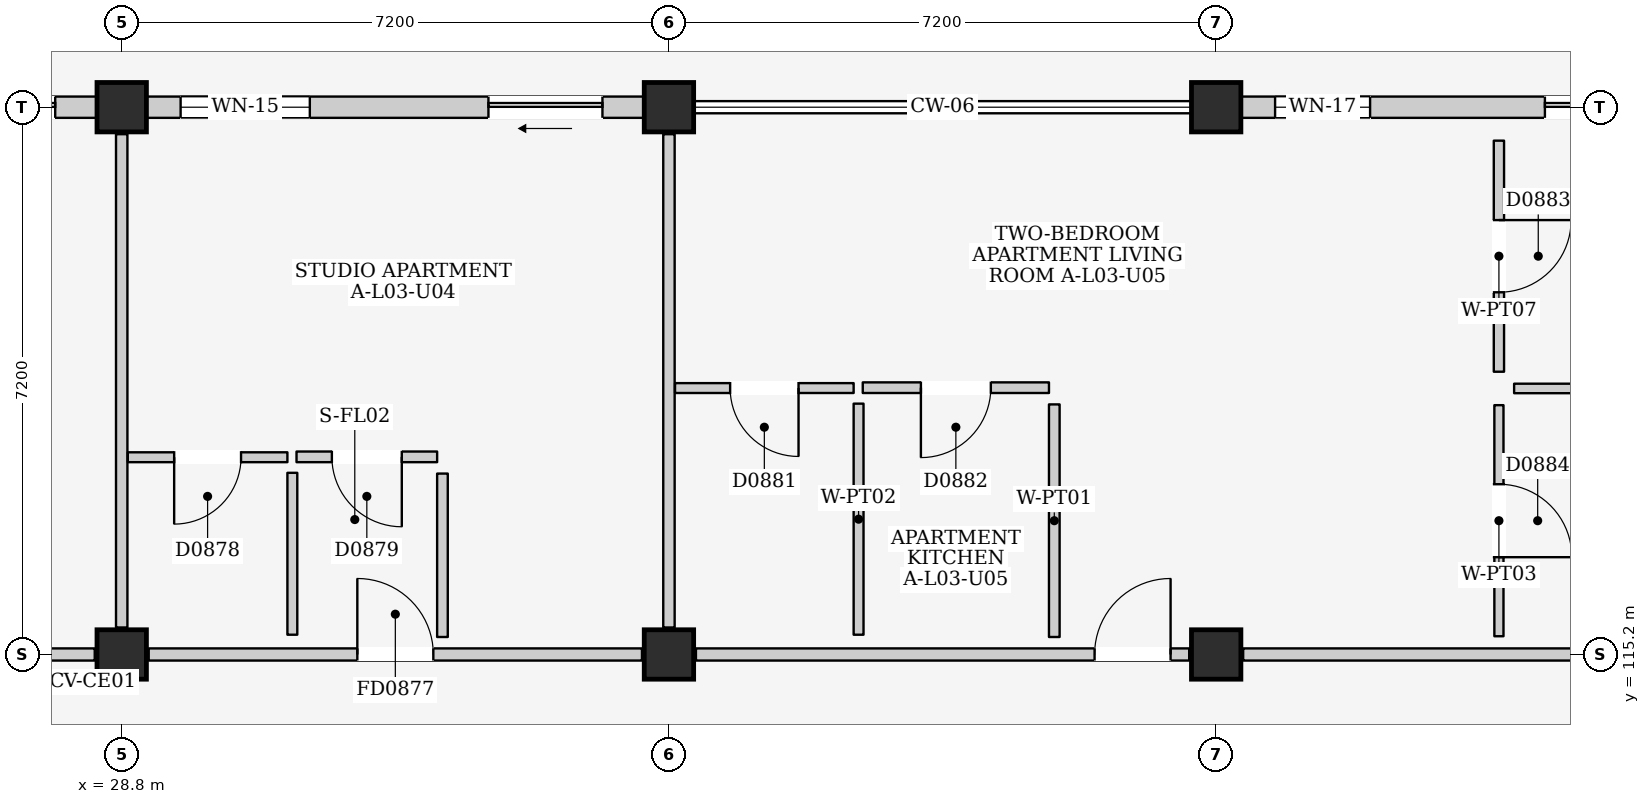
"""IFC4 building model, lengths in metres.
Left out: names, types, materials, properties, quantities, classifications, styles, units other than length and angle.
Written with IfcOpenShell. Run it as: python <this file> out.ifc"""

import sys

from ifc_helpers import new_model, si_unit, direction, frame, frame_2d, origin, origin_2d, place, context, subcontext, project, spatial, rectangle, extrude, element, fill, save


model = new_model("IFC4")
c1 = context("Model", 3, precision=1e-05, world=origin(), true_north=direction((0.0, 1.0)))
c2 = subcontext(c1, "Body", "Model", "MODEL_VIEW")
j1 = project(units=[si_unit("LENGTHUNIT", "METRE"), si_unit("PLANEANGLEUNIT", "RADIAN")], contexts=[c1])
p1 = place(None, origin())
s1 = spatial("IfcSite", under=j1, at=p1, CompositionType="ELEMENT")
p2 = place(p1, origin())
s2 = spatial("IfcBuilding", under=s1, at=p2, CompositionType="ELEMENT")
p3 = place(p2, frame((0.0, 0.0, 12.2)))
s3 = spatial("IfcBuildingStorey", under=s2, at=p3, CompositionType="ELEMENT", Elevation=12.2)
for number, where, z_axis, x_axis in (
    (1, (28.8, 115.2, 0.0), (0.0, 0.0, 1.0), (1.0, 0.0, 0.0)),
    (2, (28.8, 122.4, 0.0), (0.0, 0.0, 1.0), (1.0, 0.0, 0.0)),
    (3, (36.0, 115.2, 0.0), (0.0, 0.0, 1.0), (1.0, 0.0, 0.0)),
    (4, (36.0, 122.4, 0.0), (0.0, 0.0, 1.0), (1.0, 0.0, 0.0)),
    (5, (43.2, 115.2, 0.0), (0.0, 0.0, 1.0), (1.0, 0.0, 0.0)),
    (6, (43.2, 122.4, 0.0), (0.0, 0.0, 1.0), (1.0, 0.0, 0.0)),
):
    element("IfcColumn", number, at=place(p3, frame(where, z_axis=z_axis, x_axis=x_axis)), inside=s3, PredefinedType="COLUMN", context=c2, shape_type="SweptSolid", body=[
        extrude(rectangle(XDim=0.65, YDim=0.65, at=origin_2d()), origin(), (0.0, 0.0, 1.0), 3.2),
    ])
p4 = place(p3, frame((21.925, 122.4, 0.0), z_axis=(0.0, 0.0, 1.0), x_axis=(1.0, 0.0, 0.0)))
e7 = element("IfcWall", 7, at=p4, inside=s3, PredefinedType="ELEMENTEDWALL", context=c2, shape_type="SweptSolid", body=[
    extrude(rectangle(XDim=6.55, YDim=0.28, at=frame_2d((3.275, 0.0))), origin(), (0.0, 0.0, 1.0), 2.445),
])
p5 = place(p4, frame((4.4, 0.0, 0.0)))
e8 = element("IfcOpeningElement", 8, at=p5, cuts=e7, PredefinedType="OPENING", context=c2, shape_type="SweptSolid", body=[
    extrude(rectangle(XDim=1.6, YDim=2.12, at=frame_2d((0.8, 1.06))), frame((0.0, 0.155, 0.0), z_axis=(0.0, -1.0, 0.0), x_axis=(1.0, 0.0, 0.0)), (0.0, 0.0, 1.0), 0.31),
])
p6 = place(p4, frame((0.45, 0.0, 0.835)))
e9 = element("IfcOpeningElement", 9, at=p6, cuts=e7, PredefinedType="OPENING", context=c2, shape_type="SweptSolid", body=[
    extrude(rectangle(XDim=1.35, YDim=1.5, at=frame_2d((0.675, 0.75))), frame((0.0, 0.155, 0.0), z_axis=(0.0, -1.0, 0.0), x_axis=(1.0, 0.0, 0.0)), (0.0, 0.0, 1.0), 0.31),
])
p7 = place(p3, frame((29.125, 122.4, 0.0), z_axis=(0.0, 0.0, 1.0), x_axis=(1.0, 0.0, 0.0)))
e10 = element("IfcWall", 10, at=p7, inside=s3, PredefinedType="ELEMENTEDWALL", context=c2, shape_type="SweptSolid", body=[
    extrude(rectangle(XDim=6.55, YDim=0.28, at=frame_2d((3.275, 0.0))), origin(), (0.0, 0.0, 1.0), 2.445),
])
p8 = place(p7, frame((4.5, 0.0, 0.0)))
e11 = element("IfcOpeningElement", 11, at=p8, cuts=e10, PredefinedType="OPENING", context=c2, shape_type="SweptSolid", body=[
    extrude(rectangle(XDim=1.5, YDim=2.12, at=frame_2d((0.75, 1.06))), frame((0.0, 0.155, 0.0), z_axis=(0.0, -1.0, 0.0), x_axis=(1.0, 0.0, 0.0)), (0.0, 0.0, 1.0), 0.31),
])
p9 = place(p7, frame((0.45, 0.0, 0.885)))
e12 = element("IfcOpeningElement", 12, at=p9, cuts=e10, PredefinedType="OPENING", context=c2, shape_type="SweptSolid", body=[
    extrude(rectangle(XDim=1.7, YDim=1.45, at=frame_2d((0.85, 0.725))), frame((0.0, 0.155, 0.0), z_axis=(0.0, -1.0, 0.0), x_axis=(1.0, 0.0, 0.0)), (0.0, 0.0, 1.0), 0.31),
])
p10 = place(p3, frame((43.525, 122.4, 0.0), z_axis=(0.0, 0.0, 1.0), x_axis=(1.0, 0.0, 0.0)))
e13 = element("IfcWall", 13, at=p10, inside=s3, PredefinedType="ELEMENTEDWALL", context=c2, shape_type="SweptSolid", body=[
    extrude(rectangle(XDim=6.55, YDim=0.28, at=frame_2d((3.275, 0.0))), origin(), (0.0, 0.0, 1.0), 2.445),
])
p11 = place(p10, frame((4.0, 0.0, 0.0)))
e14 = element("IfcOpeningElement", 14, at=p11, cuts=e13, PredefinedType="OPENING", context=c2, shape_type="SweptSolid", body=[
    extrude(rectangle(XDim=2.0, YDim=2.12, at=frame_2d((1.0, 1.06))), frame((0.0, 0.155, 0.0), z_axis=(0.0, -1.0, 0.0), x_axis=(1.0, 0.0, 0.0)), (0.0, 0.0, 1.0), 0.31),
])
p12 = place(p10, frame((0.45, 0.0, 0.9)))
e15 = element("IfcOpeningElement", 15, at=p12, cuts=e13, PredefinedType="OPENING", context=c2, shape_type="SweptSolid", body=[
    extrude(rectangle(XDim=1.25, YDim=1.3, at=frame_2d((0.625, 0.65))), frame((0.0, 0.155, 0.0), z_axis=(0.0, -1.0, 0.0), x_axis=(1.0, 0.0, 0.0)), (0.0, 0.0, 1.0), 0.31),
])
p13 = place(p3, frame((21.955, 115.2, 0.0), z_axis=(0.0, 0.0, 1.0), x_axis=(1.0, 0.0, 0.0)))
e16 = element("IfcWall", 16, at=p13, inside=s3, PredefinedType="PARTITIONING", context=c2, shape_type="SweptSolid", body=[
    extrude(rectangle(XDim=6.49, YDim=0.16, at=frame_2d((3.245, 0.0))), origin(), (0.0, 0.0, 1.0), 2.315),
])
p14 = place(p13, frame((2.745, 0.0, 0.0)))
e17 = element("IfcOpeningElement", 17, at=p14, cuts=e16, PredefinedType="OPENING", context=c2, shape_type="SweptSolid", body=[
    extrude(rectangle(XDim=1.0, YDim=2.15, at=frame_2d((0.5, 1.075))), frame((0.0, 0.095, 0.0), z_axis=(0.0, -1.0, 0.0), x_axis=(1.0, 0.0, 0.0)), (0.0, 0.0, 1.0), 0.19),
])
p15 = place(p3, frame((28.8, 115.555, 0.0), z_axis=(0.0, 0.0, 1.0), x_axis=(0.0, 1.0, 0.0)))
e18 = element("IfcWall", 18, at=p15, inside=s3, PredefinedType="PARTITIONING", context=c2, shape_type="SweptSolid", body=[
    extrude(rectangle(XDim=6.49, YDim=0.15, at=frame_2d((3.245, 0.0))), origin(), (0.0, 0.0, 1.0), 2.415),
])
p16 = place(p3, frame((29.155, 115.2, 0.0), z_axis=(0.0, 0.0, 1.0), x_axis=(1.0, 0.0, 0.0)))
e19 = element("IfcWall", 19, at=p16, inside=s3, PredefinedType="PARTITIONING", context=c2, shape_type="SweptSolid", body=[
    extrude(rectangle(XDim=6.49, YDim=0.16, at=frame_2d((3.245, 0.0))), origin(), (0.0, 0.0, 1.0), 2.315),
])
p17 = place(p16, frame((2.745, 0.0, 0.0)))
e20 = element("IfcOpeningElement", 20, at=p17, cuts=e19, PredefinedType="OPENING", context=c2, shape_type="SweptSolid", body=[
    extrude(rectangle(XDim=1.0, YDim=2.15, at=frame_2d((0.5, 1.075))), frame((0.0, 0.095, 0.0), z_axis=(0.0, -1.0, 0.0), x_axis=(1.0, 0.0, 0.0)), (0.0, 0.0, 1.0), 0.19),
])
p18 = place(p3, frame((36.0, 115.555, 0.0), z_axis=(0.0, 0.0, 1.0), x_axis=(0.0, 1.0, 0.0)))
e21 = element("IfcWall", 21, at=p18, inside=s3, PredefinedType="PARTITIONING", context=c2, shape_type="SweptSolid", body=[
    extrude(rectangle(XDim=6.49, YDim=0.15, at=frame_2d((3.245, 0.0))), origin(), (0.0, 0.0, 1.0), 2.415),
])
p19 = place(p3, frame((28.88, 117.795, 0.0), z_axis=(0.0, 0.0, 1.0), x_axis=(1.0, 0.0, 0.0)))
e22 = element("IfcWall", 22, at=p19, inside=s3, PredefinedType="PARTITIONING", context=c2, shape_type="SweptSolid", body=[
    extrude(rectangle(XDim=2.1, YDim=0.13, at=frame_2d((1.05, 0.0))), origin(), (0.0, 0.0, 1.0), 2.98),
])
p20 = place(p19, frame((0.61, 0.0, 0.0)))
e23 = element("IfcOpeningElement", 23, at=p20, cuts=e22, PredefinedType="OPENING", context=c2, shape_type="SweptSolid", body=[
    extrude(rectangle(XDim=0.88, YDim=2.1, at=frame_2d((0.44, 1.05))), frame((0.0, 0.08, 0.0), z_axis=(0.0, -1.0, 0.0), x_axis=(1.0, 0.0, 0.0)), (0.0, 0.0, 1.0), 0.16),
])
p21 = place(p3, frame((31.045, 115.46, 0.0), z_axis=(0.0, 0.0, 1.0), x_axis=(0.0, 1.0, 0.0)))
e24 = element("IfcWall", 24, at=p21, inside=s3, PredefinedType="PARTITIONING", context=c2, shape_type="SweptSolid", body=[
    extrude(rectangle(XDim=2.13, YDim=0.13, at=frame_2d((1.065, 0.0))), origin(), (0.0, 0.0, 1.0), 2.98),
])
p22 = place(p3, frame((31.1, 117.8, 0.0), z_axis=(0.0, 0.0, 1.0), x_axis=(1.0, 0.0, 0.0)))
e25 = element("IfcWall", 25, at=p22, inside=s3, PredefinedType="PARTITIONING", context=c2, shape_type="SweptSolid", body=[
    extrude(rectangle(XDim=1.85, YDim=0.14, at=frame_2d((0.925, 0.0))), origin(), (0.0, 0.0, 1.0), 2.98),
])
p23 = place(p22, frame((0.465, 0.0, 0.0)))
e26 = element("IfcOpeningElement", 26, at=p23, cuts=e25, PredefinedType="OPENING", context=c2, shape_type="SweptSolid", body=[
    extrude(rectangle(XDim=0.92, YDim=2.1, at=frame_2d((0.46, 1.05))), frame((0.0, 0.085, 0.0), z_axis=(0.0, -1.0, 0.0), x_axis=(1.0, 0.0, 0.0)), (0.0, 0.0, 1.0), 0.17),
])
p24 = place(p3, frame((33.02, 115.43, 0.0), z_axis=(0.0, 0.0, 1.0), x_axis=(0.0, 1.0, 0.0)))
e27 = element("IfcWall", 27, at=p24, inside=s3, PredefinedType="PARTITIONING", context=c2, shape_type="SweptSolid", body=[
    extrude(rectangle(XDim=2.15, YDim=0.14, at=frame_2d((1.075, 0.0))), origin(), (0.0, 0.0, 1.0), 2.98),
])
p25 = place(p3, frame((36.355, 115.2, 0.0), z_axis=(0.0, 0.0, 1.0), x_axis=(1.0, 0.0, 0.0)))
e28 = element("IfcWall", 28, at=p25, inside=s3, PredefinedType="PARTITIONING", context=c2, shape_type="SweptSolid", body=[
    extrude(rectangle(XDim=6.49, YDim=0.16, at=frame_2d((3.245, 0.0))), origin(), (0.0, 0.0, 1.0), 2.315),
])
p26 = place(p25, frame((5.245, 0.0, 0.0)))
e29 = element("IfcOpeningElement", 29, at=p26, cuts=e28, PredefinedType="OPENING", context=c2, shape_type="SweptSolid", body=[
    extrude(rectangle(XDim=1.0, YDim=2.15, at=frame_2d((0.5, 1.075))), frame((0.0, 0.095, 0.0), z_axis=(0.0, -1.0, 0.0), x_axis=(1.0, 0.0, 0.0)), (0.0, 0.0, 1.0), 0.19),
])
p27 = place(p3, frame((43.555, 115.2, 0.0), z_axis=(0.0, 0.0, 1.0), x_axis=(1.0, 0.0, 0.0)))
e30 = element("IfcWall", 30, at=p27, inside=s3, PredefinedType="PARTITIONING", context=c2, shape_type="SweptSolid", body=[
    extrude(rectangle(XDim=6.49, YDim=0.16, at=frame_2d((3.245, 0.0))), origin(), (0.0, 0.0, 1.0), 2.315),
])
p28 = place(p3, frame((36.08, 118.705, 0.0), z_axis=(0.0, 0.0, 1.0), x_axis=(1.0, 0.0, 0.0)))
e31 = element("IfcWall", 31, at=p28, inside=s3, PredefinedType="PARTITIONING", context=c2, shape_type="SweptSolid", body=[
    extrude(rectangle(XDim=2.35, YDim=0.13, at=frame_2d((1.175, 0.0))), origin(), (0.0, 0.0, 1.0), 2.98),
])
p29 = place(p28, frame((0.725, 0.0, 0.0)))
e32 = element("IfcOpeningElement", 32, at=p29, cuts=e31, PredefinedType="OPENING", context=c2, shape_type="SweptSolid", body=[
    extrude(rectangle(XDim=0.9, YDim=2.1, at=frame_2d((0.45, 1.05))), frame((0.0, 0.08, 0.0), z_axis=(0.0, -1.0, 0.0), x_axis=(1.0, 0.0, 0.0)), (0.0, 0.0, 1.0), 0.16),
])
p30 = place(p3, frame((38.495, 115.46, 0.0), z_axis=(0.0, 0.0, 1.0), x_axis=(0.0, 1.0, 0.0)))
e33 = element("IfcWall", 33, at=p30, inside=s3, PredefinedType="PARTITIONING", context=c2, shape_type="SweptSolid", body=[
    extrude(rectangle(XDim=3.04, YDim=0.13, at=frame_2d((1.52, 0.0))), origin(), (0.0, 0.0, 1.0), 2.98),
])
p31 = place(p3, frame((38.55, 118.71, 0.0), z_axis=(0.0, 0.0, 1.0), x_axis=(1.0, 0.0, 0.0)))
e34 = element("IfcWall", 34, at=p31, inside=s3, PredefinedType="PARTITIONING", context=c2, shape_type="SweptSolid", body=[
    extrude(rectangle(XDim=2.45, YDim=0.14, at=frame_2d((1.225, 0.0))), origin(), (0.0, 0.0, 1.0), 2.98),
])
p32 = place(p31, frame((0.765, 0.0, 0.0)))
e35 = element("IfcOpeningElement", 35, at=p32, cuts=e34, PredefinedType="OPENING", context=c2, shape_type="SweptSolid", body=[
    extrude(rectangle(XDim=0.92, YDim=2.1, at=frame_2d((0.46, 1.05))), frame((0.0, 0.085, 0.0), z_axis=(0.0, -1.0, 0.0), x_axis=(1.0, 0.0, 0.0)), (0.0, 0.0, 1.0), 0.17),
])
p33 = place(p3, frame((41.07, 115.43, 0.0), z_axis=(0.0, 0.0, 1.0), x_axis=(0.0, 1.0, 0.0)))
e36 = element("IfcWall", 36, at=p33, inside=s3, PredefinedType="PARTITIONING", context=c2, shape_type="SweptSolid", body=[
    extrude(rectangle(XDim=3.06, YDim=0.14, at=frame_2d((1.53, 0.0))), origin(), (0.0, 0.0, 1.0), 2.98),
])
p34 = place(p3, frame((46.92, 118.92, 0.0), z_axis=(0.0, 0.0, 1.0), x_axis=(0.0, 1.0, 0.0)))
e37 = element("IfcWall", 37, at=p34, inside=s3, PredefinedType="PARTITIONING", context=c2, shape_type="SweptSolid", body=[
    extrude(rectangle(XDim=3.04, YDim=0.135, at=frame_2d((1.52, 0.0))), origin(), (0.0, 0.0, 1.0), 2.98),
])
p35 = place(p34, frame((1.045, 0.0, 0.0)))
e38 = element("IfcOpeningElement", 38, at=p35, cuts=e37, PredefinedType="OPENING", context=c2, shape_type="SweptSolid", body=[
    extrude(rectangle(XDim=0.95, YDim=2.15, at=frame_2d((0.475, 1.075))), frame((0.0, 0.083, 0.0), z_axis=(0.0, -1.0, 0.0), x_axis=(1.0, 0.0, 0.0)), (0.0, 0.0, 1.0), 0.165),
])
p36 = place(p3, frame((47.12, 118.7, 0.0), z_axis=(0.0, 0.0, 1.0), x_axis=(1.0, 0.0, 0.0)))
e39 = element("IfcWall", 39, at=p36, inside=s3, PredefinedType="PARTITIONING", context=c2, shape_type="SweptSolid", body=[
    extrude(rectangle(XDim=3.06, YDim=0.125, at=frame_2d((1.53, 0.0))), origin(), (0.0, 0.0, 1.0), 2.98),
])
p37 = place(p3, frame((46.92, 115.44, 0.0), z_axis=(0.0, 0.0, 1.0), x_axis=(0.0, 1.0, 0.0)))
e40 = element("IfcWall", 40, at=p37, inside=s3, PredefinedType="PARTITIONING", context=c2, shape_type="SweptSolid", body=[
    extrude(rectangle(XDim=3.04, YDim=0.12, at=frame_2d((1.52, 0.0))), origin(), (0.0, 0.0, 1.0), 2.98),
])
p38 = place(p37, frame((1.04, 0.0, 0.0)))
e41 = element("IfcOpeningElement", 41, at=p38, cuts=e40, PredefinedType="OPENING", context=c2, shape_type="SweptSolid", body=[
    extrude(rectangle(XDim=0.96, YDim=2.15, at=frame_2d((0.48, 1.075))), frame((0.0, 0.075, 0.0), z_axis=(0.0, -1.0, 0.0), x_axis=(1.0, 0.0, 0.0)), (0.0, 0.0, 1.0), 0.15),
])
p39 = place(p5, frame((1.6, 0.0, 0.0), z_axis=(0.0, 0.0, 1.0), x_axis=(-1.0, 0.0, 0.0)))
e42 = element("IfcDoor", 42, at=p39, inside=s3, OperationType="SLIDING_TO_RIGHT", PredefinedType="DOOR", context=c2, shape_type="SweptSolid", body=[
    extrude(rectangle(XDim=1.6, YDim=2.12, at=frame_2d((0.8, 1.06))), frame((0.0, 0.025, 0.0), z_axis=(0.0, -1.0, 0.0), x_axis=(1.0, 0.0, 0.0)), (0.0, 0.0, 1.0), 0.05),
])
fill(e8, e42)
p40 = place(p8, frame((1.5, 0.0, 0.0), z_axis=(0.0, 0.0, 1.0), x_axis=(-1.0, 0.0, 0.0)))
e43 = element("IfcDoor", 43, at=p40, inside=s3, OperationType="SLIDING_TO_LEFT", PredefinedType="DOOR", context=c2, shape_type="SweptSolid", body=[
    extrude(rectangle(XDim=1.5, YDim=2.12, at=frame_2d((0.75, 1.06))), frame((0.0, 0.025, 0.0), z_axis=(0.0, -1.0, 0.0), x_axis=(1.0, 0.0, 0.0)), (0.0, 0.0, 1.0), 0.05),
])
fill(e11, e43)
p41 = place(p9, origin())
e44 = element("IfcWindow", 44, at=p41, inside=s3, PartitioningType="DOUBLE_PANEL_VERTICAL", PredefinedType="WINDOW", context=c2, shape_type="SweptSolid", body=[
    extrude(rectangle(XDim=1.7, YDim=1.45, at=frame_2d((0.85, 0.725))), frame((0.0, 0.03, 0.0), z_axis=(0.0, -1.0, 0.0), x_axis=(1.0, 0.0, 0.0)), (0.0, 0.0, 1.0), 0.06),
])
fill(e12, e44)
p42 = place(p11, frame((2.0, 0.0, 0.0), z_axis=(0.0, 0.0, 1.0), x_axis=(-1.0, 0.0, 0.0)))
e45 = element("IfcDoor", 45, at=p42, inside=s3, OperationType="DOUBLE_DOOR_SLIDING", PredefinedType="DOOR", context=c2, shape_type="SweptSolid", body=[
    extrude(rectangle(XDim=2.0, YDim=2.12, at=frame_2d((1.0, 1.06))), frame((0.0, 0.025, 0.0), z_axis=(0.0, -1.0, 0.0), x_axis=(1.0, 0.0, 0.0)), (0.0, 0.0, 1.0), 0.05),
])
fill(e14, e45)
p43 = place(p12, origin())
e46 = element("IfcWindow", 46, at=p43, inside=s3, PartitioningType="SINGLE_PANEL", PredefinedType="WINDOW", context=c2, shape_type="SweptSolid", body=[
    extrude(rectangle(XDim=1.25, YDim=1.3, at=frame_2d((0.625, 0.65))), frame((0.0, 0.03, 0.0), z_axis=(0.0, -1.0, 0.0), x_axis=(1.0, 0.0, 0.0)), (0.0, 0.0, 1.0), 0.06),
])
fill(e15, e46)
p44 = place(p17, origin())
e47 = element("IfcDoor", 47, at=p44, inside=s3, OperationType="SINGLE_SWING_LEFT", PredefinedType="DOOR", context=c2, shape_type="SweptSolid", body=[
    extrude(rectangle(XDim=1.0, YDim=2.15, at=frame_2d((0.5, 1.075))), frame((0.0, 0.025, 0.0), z_axis=(0.0, -1.0, 0.0), x_axis=(1.0, 0.0, 0.0)), (0.0, 0.0, 1.0), 0.05),
])
fill(e20, e47)
p45 = place(p20, frame((0.88, 0.0, 0.0), z_axis=(0.0, 0.0, 1.0), x_axis=(-1.0, 0.0, 0.0)))
e48 = element("IfcDoor", 48, at=p45, inside=s3, OperationType="SINGLE_SWING_RIGHT", PredefinedType="DOOR", context=c2, shape_type="SweptSolid", body=[
    extrude(rectangle(XDim=0.88, YDim=2.1, at=frame_2d((0.44, 1.05))), frame((0.0, 0.025, 0.0), z_axis=(0.0, -1.0, 0.0), x_axis=(1.0, 0.0, 0.0)), (0.0, 0.0, 1.0), 0.05),
])
fill(e23, e48)
p46 = place(p23, frame((0.92, 0.0, 0.0), z_axis=(0.0, 0.0, 1.0), x_axis=(-1.0, 0.0, 0.0)))
e49 = element("IfcDoor", 49, at=p46, inside=s3, OperationType="SINGLE_SWING_LEFT", PredefinedType="DOOR", context=c2, shape_type="SweptSolid", body=[
    extrude(rectangle(XDim=0.92, YDim=2.1, at=frame_2d((0.46, 1.05))), frame((0.0, 0.025, 0.0), z_axis=(0.0, -1.0, 0.0), x_axis=(1.0, 0.0, 0.0)), (0.0, 0.0, 1.0), 0.05),
])
fill(e26, e49)
p47 = place(p26, origin())
e50 = element("IfcDoor", 50, at=p47, inside=s3, OperationType="SINGLE_SWING_RIGHT", PredefinedType="DOOR", context=c2, shape_type="SweptSolid", body=[
    extrude(rectangle(XDim=1.0, YDim=2.15, at=frame_2d((0.5, 1.075))), frame((0.0, 0.025, 0.0), z_axis=(0.0, -1.0, 0.0), x_axis=(1.0, 0.0, 0.0)), (0.0, 0.0, 1.0), 0.05),
])
fill(e29, e50)
p48 = place(p29, frame((0.9, 0.0, 0.0), z_axis=(0.0, 0.0, 1.0), x_axis=(-1.0, 0.0, 0.0)))
e51 = element("IfcDoor", 51, at=p48, inside=s3, OperationType="SINGLE_SWING_LEFT", PredefinedType="DOOR", context=c2, shape_type="SweptSolid", body=[
    extrude(rectangle(XDim=0.9, YDim=2.1, at=frame_2d((0.45, 1.05))), frame((0.0, 0.025, 0.0), z_axis=(0.0, -1.0, 0.0), x_axis=(1.0, 0.0, 0.0)), (0.0, 0.0, 1.0), 0.05),
])
fill(e32, e51)
p49 = place(p32, frame((0.92, 0.0, 0.0), z_axis=(0.0, 0.0, 1.0), x_axis=(-1.0, 0.0, 0.0)))
e52 = element("IfcDoor", 52, at=p49, inside=s3, OperationType="SINGLE_SWING_RIGHT", PredefinedType="DOOR", context=c2, shape_type="SweptSolid", body=[
    extrude(rectangle(XDim=0.92, YDim=2.1, at=frame_2d((0.46, 1.05))), frame((0.0, 0.025, 0.0), z_axis=(0.0, -1.0, 0.0), x_axis=(1.0, 0.0, 0.0)), (0.0, 0.0, 1.0), 0.05),
])
fill(e35, e52)
p50 = place(p35, frame((0.95, 0.0, 0.0), z_axis=(0.0, 0.0, 1.0), x_axis=(-1.0, 0.0, 0.0)))
e53 = element("IfcDoor", 53, at=p50, inside=s3, OperationType="SINGLE_SWING_LEFT", PredefinedType="DOOR", context=c2, shape_type="SweptSolid", body=[
    extrude(rectangle(XDim=0.95, YDim=2.15, at=frame_2d((0.475, 1.075))), frame((0.0, 0.025, 0.0), z_axis=(0.0, -1.0, 0.0), x_axis=(1.0, 0.0, 0.0)), (0.0, 0.0, 1.0), 0.05),
])
fill(e38, e53)
p51 = place(p38, frame((0.96, 0.0, 0.0), z_axis=(0.0, 0.0, 1.0), x_axis=(-1.0, 0.0, 0.0)))
e54 = element("IfcDoor", 54, at=p51, inside=s3, OperationType="SINGLE_SWING_RIGHT", PredefinedType="DOOR", context=c2, shape_type="SweptSolid", body=[
    extrude(rectangle(XDim=0.96, YDim=2.15, at=frame_2d((0.48, 1.075))), frame((0.0, 0.025, 0.0), z_axis=(0.0, -1.0, 0.0), x_axis=(1.0, 0.0, 0.0)), (0.0, 0.0, 1.0), 0.05),
])
fill(e41, e54)
save(model, sys.argv[1])
